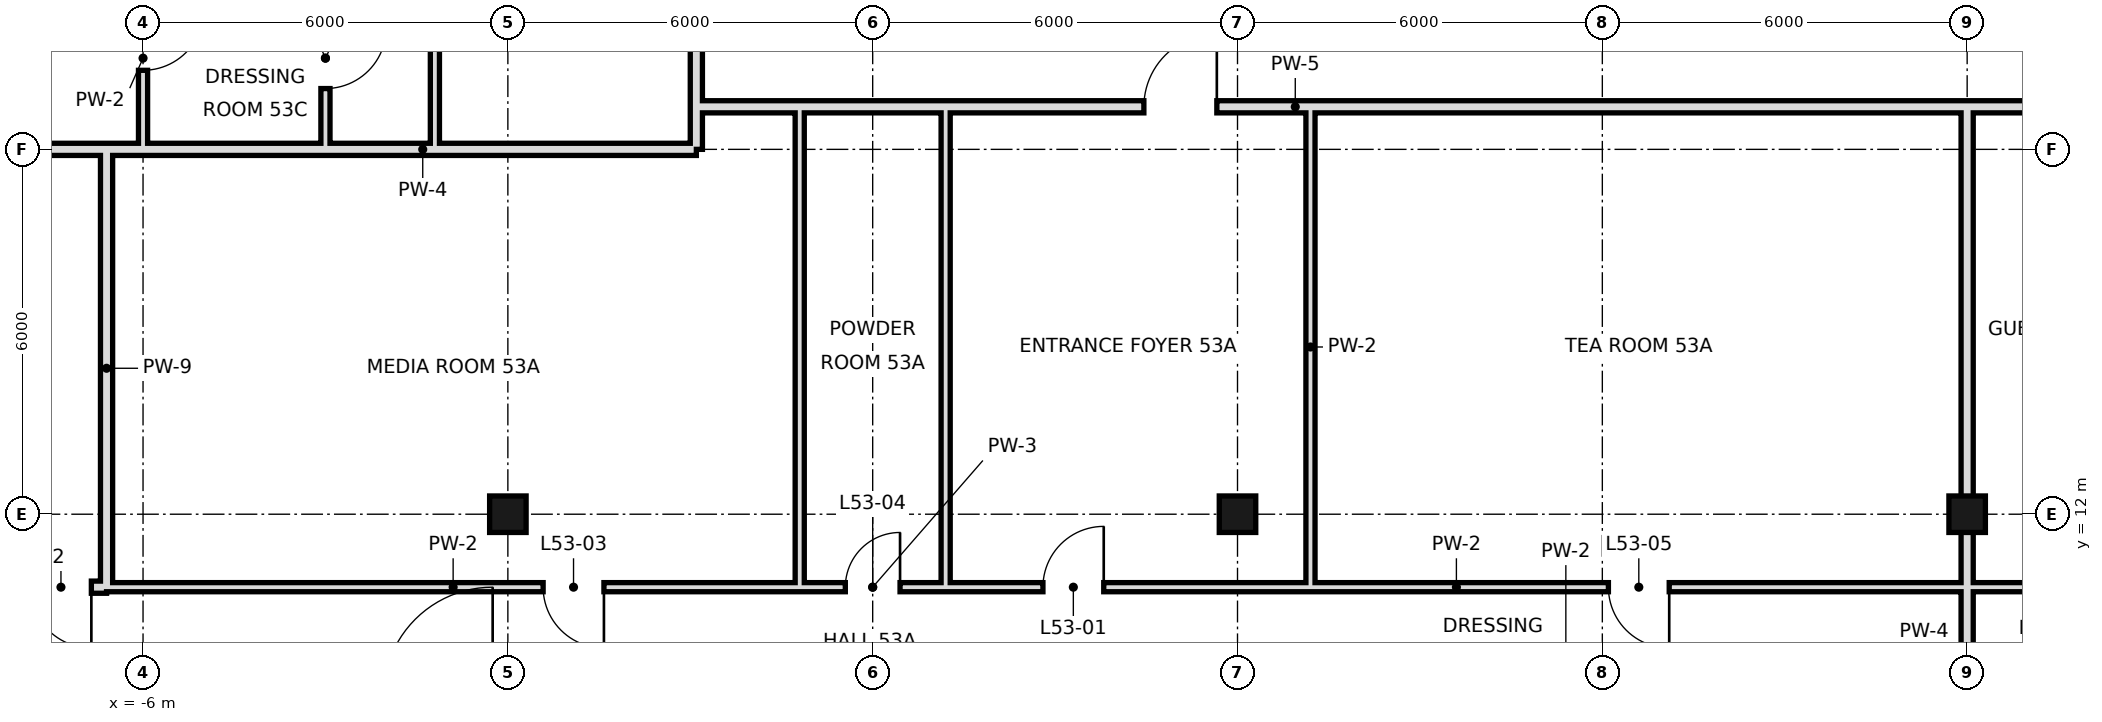
"""IFC4 building model, lengths in metres.
Left out: names, types, materials, properties, quantities, classifications, styles, units other than length and angle.
Written with IfcOpenShell. Run it as: python <this file> out.ifc"""

import sys

from ifc_helpers import new_model, si_unit, direction, frame, frame_2d, origin, origin_2d, place, context, subcontext, project, spatial, rectangle, hollow_rectangle, extrude, element, fill, save


model = new_model("IFC4")
c1 = context("Model", 3, precision=1e-05, world=origin(), true_north=direction((0.0, 1.0)))
c2 = subcontext(c1, "Body", "Model", "MODEL_VIEW")
j1 = project(units=[si_unit("LENGTHUNIT", "METRE"), si_unit("PLANEANGLEUNIT", "RADIAN")], contexts=[c1])
p1 = place(None, origin())
s1 = spatial("IfcSite", under=j1, at=p1, CompositionType="ELEMENT")
p2 = place(p1, origin())
s2 = spatial("IfcBuilding", under=s1, at=p2, CompositionType="ELEMENT")
p3 = place(p2, frame((0.0, 0.0, 226.2)))
s3 = spatial("IfcBuildingStorey", under=s2, at=p3, CompositionType="ELEMENT", Elevation=226.2)
for number, where, z_axis, x_axis in (
    (1, (0.0, 12.0, 0.0), (0.0, 0.0, 1.0), (1.0, 0.0, 0.0)),
    (2, (12.0, 12.0, 0.0), (0.0, 0.0, 1.0), (1.0, 0.0, 0.0)),
    (3, (24.0, 12.0, 0.0), (0.0, 0.0, 1.0), (1.0, 0.0, 0.0)),
):
    element("IfcColumn", number, at=place(p3, frame(where, z_axis=z_axis, x_axis=x_axis)), inside=s3, PredefinedType="COLUMN", context=c2, shape_type="SweptSolid", body=[
        extrude(hollow_rectangle(XDim=0.6, YDim=0.6, WallThickness=0.028, at=origin_2d()), origin(), (0.0, 0.0, 1.0), 3.6),
    ])
p4 = place(p3, frame((-1.2, 18.0, 0.0), z_axis=(0.0, 0.0, 1.0), x_axis=(0.0, 1.0, 0.0)))
e4 = element("IfcWall", 4, at=p4, inside=s3, PredefinedType="PARTITIONING", context=c2, shape_type="SweptSolid", body=[
    extrude(rectangle(XDim=22.8, YDim=0.15, at=frame_2d((11.4, 0.0))), origin(), (0.0, 0.0, 1.0), 3.42),
])
p5 = place(p4, frame((20.08, 0.0, 0.0)))
e5 = element("IfcOpeningElement", 5, at=p5, cuts=e4, PredefinedType="OPENING", context=c2, shape_type="SweptSolid", body=[
    extrude(rectangle(XDim=1.0, YDim=2.4, at=frame_2d((0.5, 1.2))), frame((0.0, 0.085, 0.0), z_axis=(0.0, -1.0, 0.0), x_axis=(1.0, 0.0, 0.0)), (0.0, 0.0, 1.0), 0.17),
])
p6 = place(p4, frame((7.6, 0.0, 0.0)))
e6 = element("IfcOpeningElement", 6, at=p6, cuts=e4, PredefinedType="OPENING", context=c2, shape_type="SweptSolid", body=[
    extrude(rectangle(XDim=1.0, YDim=2.4, at=frame_2d((0.5, 1.2))), frame((0.0, 0.085, 0.0), z_axis=(0.0, -1.0, 0.0), x_axis=(1.0, 0.0, 0.0)), (0.0, 0.0, 1.0), 0.17),
])
p7 = place(p4, frame((16.24, 0.0, 0.0)))
e7 = element("IfcOpeningElement", 7, at=p7, cuts=e4, PredefinedType="OPENING", context=c2, shape_type="SweptSolid", body=[
    extrude(rectangle(XDim=1.0, YDim=2.4, at=frame_2d((0.5, 1.2))), frame((0.0, 0.085, 0.0), z_axis=(0.0, -1.0, 0.0), x_axis=(1.0, 0.0, 0.0)), (0.0, 0.0, 1.0), 0.17),
])
p8 = place(p3, frame((-3.0, 18.0, 0.0), z_axis=(0.0, 0.0, 1.0), x_axis=(0.0, 1.0, 0.0)))
e8 = element("IfcWall", 8, at=p8, inside=s3, PredefinedType="PARTITIONING", context=c2, shape_type="SweptSolid", body=[
    extrude(rectangle(XDim=3.0, YDim=0.15, at=frame_2d((1.5, 0.0))), origin(), (0.0, 0.0, 1.0), 3.42),
])
p9 = place(p8, frame((1.0, 0.0, 0.0)))
e9 = element("IfcOpeningElement", 9, at=p9, cuts=e8, PredefinedType="OPENING", context=c2, shape_type="SweptSolid", body=[
    extrude(rectangle(XDim=1.0, YDim=2.4, at=frame_2d((0.5, 1.2))), frame((0.0, 0.085, 0.0), z_axis=(0.0, -1.0, 0.0), x_axis=(1.0, 0.0, 0.0)), (0.0, 0.0, 1.0), 0.17),
])
p10 = place(p3, frame((-6.0, 18.0, 0.0), z_axis=(0.0, 0.0, 1.0), x_axis=(0.0, 1.0, 0.0)))
e10 = element("IfcWall", 10, at=p10, inside=s3, PredefinedType="PARTITIONING", context=c2, shape_type="SweptSolid", body=[
    extrude(rectangle(XDim=3.0, YDim=0.15, at=frame_2d((1.5, 0.0))), origin(), (0.0, 0.0, 1.0), 3.42),
])
p11 = place(p10, frame((1.3, 0.0, 0.0)))
e11 = element("IfcOpeningElement", 11, at=p11, cuts=e10, PredefinedType="OPENING", context=c2, shape_type="SweptSolid", body=[
    extrude(rectangle(XDim=1.0, YDim=2.4, at=frame_2d((0.5, 1.2))), frame((0.0, 0.085, 0.0), z_axis=(0.0, -1.0, 0.0), x_axis=(1.0, 0.0, 0.0)), (0.0, 0.0, 1.0), 0.17),
])
p12 = place(p3, frame((-6.6, 10.8, 0.0), z_axis=(0.0, 0.0, 1.0), x_axis=(0.0, 1.0, 0.0)))
e12 = element("IfcWall", 12, at=p12, inside=s3, PredefinedType="SOLIDWALL", context=c2, shape_type="SweptSolid", body=[
    extrude(rectangle(XDim=7.2, YDim=0.2, at=frame_2d((3.6, 0.0))), origin(), (0.0, 0.0, 1.0), 2.72),
])
p13 = place(p3, frame((13.2, 10.8, 0.0), z_axis=(0.0, 0.0, 1.0), x_axis=(0.0, 1.0, 0.0)))
e13 = element("IfcWall", 13, at=p13, inside=s3, PredefinedType="PARTITIONING", context=c2, shape_type="SweptSolid", body=[
    extrude(rectangle(XDim=7.9, YDim=0.15, at=frame_2d((3.95, 0.0))), origin(), (0.0, 0.0, 1.0), 3.42),
])
p14 = place(p3, frame((24.0, 0.0, 0.0), z_axis=(0.0, 0.0, 1.0), x_axis=(0.0, 1.0, 0.0)))
e14 = element("IfcWall", 14, at=p14, inside=s3, PredefinedType="SOLIDWALL", context=c2, shape_type="SweptSolid", body=[
    extrude(rectangle(XDim=18.7, YDim=0.2, at=frame_2d((9.35, 0.0))), origin(), (0.0, 0.0, 1.0), 2.72),
])
p15 = place(p3, frame((3.1, 18.7, 0.0), z_axis=(0.0, 0.0, 1.0), x_axis=(0.0, 1.0, 0.0)))
e15 = element("IfcWall", 15, at=p15, inside=s3, PredefinedType="SOLIDWALL", context=c2, shape_type="SweptSolid", body=[
    extrude(rectangle(XDim=22.1, YDim=0.2, at=frame_2d((11.05, 0.0))), origin(), (0.0, 0.0, 1.0), 2.97),
])
p16 = place(p15, frame((20.08, 0.0, 0.0)))
e16 = element("IfcOpeningElement", 16, at=p16, cuts=e15, PredefinedType="OPENING", context=c2, shape_type="SweptSolid", body=[
    extrude(rectangle(XDim=1.2, YDim=2.4, at=frame_2d((0.6, 1.2))), frame((0.0, 0.11, 0.0), z_axis=(0.0, -1.0, 0.0), x_axis=(1.0, 0.0, 0.0)), (0.0, 0.0, 1.0), 0.22),
])
p17 = place(p3, frame((3.1, 18.0, 0.0), z_axis=(0.0, 0.0, 1.0), x_axis=(0.0, 1.0, 0.0)))
e17 = element("IfcWall", 17, at=p17, inside=s3, PredefinedType="SOLIDWALL", context=c2, shape_type="SweptSolid", body=[
    extrude(rectangle(XDim=0.7, YDim=0.2, at=frame_2d((0.35, 0.0))), origin(), (0.0, 0.0, 1.0), 2.97),
])
for number, where, z_axis, x_axis in (
    (18, (4.8, 10.8, 0.0), (0.0, 0.0, 1.0), (0.0, 1.0, 0.0)),
    (19, (7.2, 10.8, 0.0), (0.0, 0.0, 1.0), (0.0, 1.0, 0.0)),
):
    element("IfcWall", number, at=place(p3, frame(where, z_axis=z_axis, x_axis=x_axis)), inside=s3, PredefinedType="PARTITIONING", context=c2, shape_type="SweptSolid", body=[
        extrude(rectangle(XDim=7.9, YDim=0.15, at=frame_2d((3.95, 0.0))), origin(), (0.0, 0.0, 1.0), 3.42),
    ])
p18 = place(p3, frame((-12.6, 10.8, 0.0), z_axis=(0.0, 0.0, 1.0), x_axis=(1.0, 0.0, 0.0)))
e20 = element("IfcWall", 20, at=p18, inside=s3, PredefinedType="SOLIDWALL", context=c2, shape_type="SweptSolid", body=[
    extrude(rectangle(XDim=6.0, YDim=0.2, at=frame_2d((3.0, 0.0))), origin(), (0.0, 0.0, 1.0), 2.97),
])
p19 = place(p18, frame((4.75, 0.0, 0.0)))
e21 = element("IfcOpeningElement", 21, at=p19, cuts=e20, PredefinedType="OPENING", context=c2, shape_type="SweptSolid", body=[
    extrude(rectangle(XDim=1.0, YDim=2.4, at=frame_2d((0.5, 1.2))), frame((0.0, 0.11, 0.0), z_axis=(0.0, -1.0, 0.0), x_axis=(1.0, 0.0, 0.0)), (0.0, 0.0, 1.0), 0.22),
])
p20 = place(p3, frame((-6.6, 10.8, 0.0), z_axis=(0.0, 0.0, 1.0), x_axis=(1.0, 0.0, 0.0)))
e22 = element("IfcWall", 22, at=p20, inside=s3, PredefinedType="PARTITIONING", context=c2, shape_type="SweptSolid", body=[
    extrude(rectangle(XDim=11.4, YDim=0.15, at=frame_2d((5.7, 0.0))), origin(), (0.0, 0.0, 1.0), 3.42),
])
p21 = place(p20, frame((7.18, 0.0, 0.0)))
e23 = element("IfcOpeningElement", 23, at=p21, cuts=e22, PredefinedType="OPENING", context=c2, shape_type="SweptSolid", body=[
    extrude(rectangle(XDim=1.0, YDim=2.4, at=frame_2d((0.5, 1.2))), frame((0.0, 0.085, 0.0), z_axis=(0.0, -1.0, 0.0), x_axis=(1.0, 0.0, 0.0)), (0.0, 0.0, 1.0), 0.17),
])
p22 = place(p3, frame((7.2, 10.8, 0.0), z_axis=(0.0, 0.0, 1.0), x_axis=(1.0, 0.0, 0.0)))
e24 = element("IfcWall", 24, at=p22, inside=s3, PredefinedType="PARTITIONING", context=c2, shape_type="SweptSolid", body=[
    extrude(rectangle(XDim=16.8, YDim=0.15, at=frame_2d((8.4, 0.0))), origin(), (0.0, 0.0, 1.0), 3.42),
])
p23 = place(p22, frame((1.6, 0.0, 0.0)))
e25 = element("IfcOpeningElement", 25, at=p23, cuts=e24, PredefinedType="OPENING", context=c2, shape_type="SweptSolid", body=[
    extrude(rectangle(XDim=1.0, YDim=2.4, at=frame_2d((0.5, 1.2))), frame((0.0, 0.085, 0.0), z_axis=(0.0, -1.0, 0.0), x_axis=(1.0, 0.0, 0.0)), (0.0, 0.0, 1.0), 0.17),
])
p24 = place(p22, frame((10.9, 0.0, 0.0)))
e26 = element("IfcOpeningElement", 26, at=p24, cuts=e24, PredefinedType="OPENING", context=c2, shape_type="SweptSolid", body=[
    extrude(rectangle(XDim=1.0, YDim=2.4, at=frame_2d((0.5, 1.2))), frame((0.0, 0.085, 0.0), z_axis=(0.0, -1.0, 0.0), x_axis=(1.0, 0.0, 0.0)), (0.0, 0.0, 1.0), 0.17),
])
p25 = place(p3, frame((4.8, 10.8, 0.0), z_axis=(0.0, 0.0, 1.0), x_axis=(1.0, 0.0, 0.0)))
e27 = element("IfcWall", 27, at=p25, inside=s3, PredefinedType="PARTITIONING", context=c2, shape_type="SweptSolid", body=[
    extrude(rectangle(XDim=2.4, YDim=0.15, at=frame_2d((1.2, 0.0))), origin(), (0.0, 0.0, 1.0), 3.42),
])
p26 = place(p25, frame((0.75, 0.0, 0.0)))
e28 = element("IfcOpeningElement", 28, at=p26, cuts=e27, PredefinedType="OPENING", context=c2, shape_type="SweptSolid", body=[
    extrude(rectangle(XDim=0.9, YDim=2.4, at=frame_2d((0.45, 1.2))), frame((0.0, 0.085, 0.0), z_axis=(0.0, -1.0, 0.0), x_axis=(1.0, 0.0, 0.0)), (0.0, 0.0, 1.0), 0.17),
])
p27 = place(p3, frame((24.0, 10.8, 0.0), z_axis=(0.0, 0.0, 1.0), x_axis=(1.0, 0.0, 0.0)))
e29 = element("IfcWall", 29, at=p27, inside=s3, PredefinedType="PARTITIONING", context=c2, shape_type="SweptSolid", body=[
    extrude(rectangle(XDim=2.4, YDim=0.15, at=frame_2d((1.2, 0.0))), origin(), (0.0, 0.0, 1.0), 3.42),
])
p28 = place(p27, frame((0.95, 0.0, 0.0)))
e30 = element("IfcOpeningElement", 30, at=p28, cuts=e29, PredefinedType="OPENING", context=c2, shape_type="SweptSolid", body=[
    extrude(rectangle(XDim=0.9, YDim=2.4, at=frame_2d((0.45, 1.2))), frame((0.0, 0.085, 0.0), z_axis=(0.0, -1.0, 0.0), x_axis=(1.0, 0.0, 0.0)), (0.0, 0.0, 1.0), 0.17),
])
p29 = place(p3, frame((-12.6, 18.0, 0.0), z_axis=(0.0, 0.0, 1.0), x_axis=(1.0, 0.0, 0.0)))
e31 = element("IfcWall", 31, at=p29, inside=s3, PredefinedType="SOLIDWALL", context=c2, shape_type="SweptSolid", body=[
    extrude(rectangle(XDim=6.0, YDim=0.2, at=frame_2d((3.0, 0.0))), origin(), (0.0, 0.0, 1.0), 2.72),
])
p30 = place(p3, frame((-6.6, 18.0, 0.0), z_axis=(0.0, 0.0, 1.0), x_axis=(1.0, 0.0, 0.0)))
e32 = element("IfcWall", 32, at=p30, inside=s3, PredefinedType="SOLIDWALL", context=c2, shape_type="SweptSolid", body=[
    extrude(rectangle(XDim=9.7, YDim=0.2, at=frame_2d((4.85, 0.0))), origin(), (0.0, 0.0, 1.0), 2.72),
])
p31 = place(p3, frame((3.1, 18.7, 0.0), z_axis=(0.0, 0.0, 1.0), x_axis=(1.0, 0.0, 0.0)))
e33 = element("IfcWall", 33, at=p31, inside=s3, PredefinedType="SOLIDWALL", context=c2, shape_type="SweptSolid", body=[
    extrude(rectangle(XDim=41.8, YDim=0.2, at=frame_2d((20.9, 0.0))), origin(), (0.0, 0.0, 1.0), 2.72),
])
p32 = place(p31, frame((7.36, 0.0, 0.0)))
e34 = element("IfcOpeningElement", 34, at=p32, cuts=e33, PredefinedType="OPENING", context=c2, shape_type="SweptSolid", body=[
    extrude(rectangle(XDim=1.2, YDim=2.4, at=frame_2d((0.6, 1.2))), frame((0.0, 0.11, 0.0), z_axis=(0.0, -1.0, 0.0), x_axis=(1.0, 0.0, 0.0)), (0.0, 0.0, 1.0), 0.22),
])
p33 = place(p31, frame((24.48, 0.0, 0.0)))
e35 = element("IfcOpeningElement", 35, at=p33, cuts=e33, PredefinedType="OPENING", context=c2, shape_type="SweptSolid", body=[
    extrude(rectangle(XDim=1.2, YDim=2.4, at=frame_2d((0.6, 1.2))), frame((0.0, 0.11, 0.0), z_axis=(0.0, -1.0, 0.0), x_axis=(1.0, 0.0, 0.0)), (0.0, 0.0, 1.0), 0.22),
])
p34 = place(p23, frame((1.0, 0.0, 0.0), z_axis=(0.0, 0.0, 1.0), x_axis=(-1.0, 0.0, 0.0)))
e36 = element("IfcDoor", 36, at=p34, inside=s3, OperationType="SINGLE_SWING_LEFT", PredefinedType="DOOR", context=c2, shape_type="SweptSolid", body=[
    extrude(rectangle(XDim=1.0, YDim=2.4, at=frame_2d((0.5, 1.2))), frame((0.0, 0.025, 0.0), z_axis=(0.0, -1.0, 0.0), x_axis=(1.0, 0.0, 0.0)), (0.0, 0.0, 1.0), 0.05),
])
fill(e25, e36)
p35 = place(p19, origin())
e37 = element("IfcDoor", 37, at=p35, inside=s3, OperationType="SINGLE_SWING_RIGHT", PredefinedType="DOOR", context=c2, shape_type="SweptSolid", body=[
    extrude(rectangle(XDim=1.0, YDim=2.4, at=frame_2d((0.5, 1.2))), frame((0.0, 0.025, 0.0), z_axis=(0.0, -1.0, 0.0), x_axis=(1.0, 0.0, 0.0)), (0.0, 0.0, 1.0), 0.05),
])
fill(e21, e37)
p36 = place(p21, origin())
e38 = element("IfcDoor", 38, at=p36, inside=s3, OperationType="SINGLE_SWING_RIGHT", PredefinedType="DOOR", context=c2, shape_type="SweptSolid", body=[
    extrude(rectangle(XDim=1.0, YDim=2.4, at=frame_2d((0.5, 1.2))), frame((0.0, 0.025, 0.0), z_axis=(0.0, -1.0, 0.0), x_axis=(1.0, 0.0, 0.0)), (0.0, 0.0, 1.0), 0.05),
])
fill(e23, e38)
p37 = place(p26, frame((0.9, 0.0, 0.0), z_axis=(0.0, 0.0, 1.0), x_axis=(-1.0, 0.0, 0.0)))
e39 = element("IfcDoor", 39, at=p37, inside=s3, OperationType="SINGLE_SWING_LEFT", PredefinedType="DOOR", context=c2, shape_type="SweptSolid", body=[
    extrude(rectangle(XDim=0.9, YDim=2.4, at=frame_2d((0.45, 1.2))), frame((0.0, 0.025, 0.0), z_axis=(0.0, -1.0, 0.0), x_axis=(1.0, 0.0, 0.0)), (0.0, 0.0, 1.0), 0.05),
])
fill(e28, e39)
p38 = place(p24, origin())
e40 = element("IfcDoor", 40, at=p38, inside=s3, OperationType="SINGLE_SWING_RIGHT", PredefinedType="DOOR", context=c2, shape_type="SweptSolid", body=[
    extrude(rectangle(XDim=1.0, YDim=2.4, at=frame_2d((0.5, 1.2))), frame((0.0, 0.025, 0.0), z_axis=(0.0, -1.0, 0.0), x_axis=(1.0, 0.0, 0.0)), (0.0, 0.0, 1.0), 0.05),
])
fill(e26, e40)
p39 = place(p9, origin())
e41 = element("IfcDoor", 41, at=p39, inside=s3, OperationType="SINGLE_SWING_RIGHT", PredefinedType="DOOR", context=c2, shape_type="SweptSolid", body=[
    extrude(rectangle(XDim=1.0, YDim=2.4, at=frame_2d((0.5, 1.2))), frame((0.0, 0.025, 0.0), z_axis=(0.0, -1.0, 0.0), x_axis=(1.0, 0.0, 0.0)), (0.0, 0.0, 1.0), 0.05),
])
fill(e9, e41)
p40 = place(p11, origin())
e42 = element("IfcDoor", 42, at=p40, inside=s3, OperationType="SINGLE_SWING_RIGHT", PredefinedType="DOOR", context=c2, shape_type="SweptSolid", body=[
    extrude(rectangle(XDim=1.0, YDim=2.4, at=frame_2d((0.5, 1.2))), frame((0.0, 0.025, 0.0), z_axis=(0.0, -1.0, 0.0), x_axis=(1.0, 0.0, 0.0)), (0.0, 0.0, 1.0), 0.05),
])
fill(e11, e42)
p41 = place(p32, frame((1.2, 0.0, 0.0), z_axis=(0.0, 0.0, 1.0), x_axis=(-1.0, 0.0, 0.0)))
e43 = element("IfcDoor", 43, at=p41, inside=s3, OperationType="SINGLE_SWING_LEFT", PredefinedType="DOOR", context=c2, shape_type="SweptSolid", body=[
    extrude(rectangle(XDim=1.2, YDim=2.4, at=frame_2d((0.6, 1.2))), frame((0.0, 0.025, 0.0), z_axis=(0.0, -1.0, 0.0), x_axis=(1.0, 0.0, 0.0)), (0.0, 0.0, 1.0), 0.05),
])
fill(e34, e43)
save(model, sys.argv[1])
